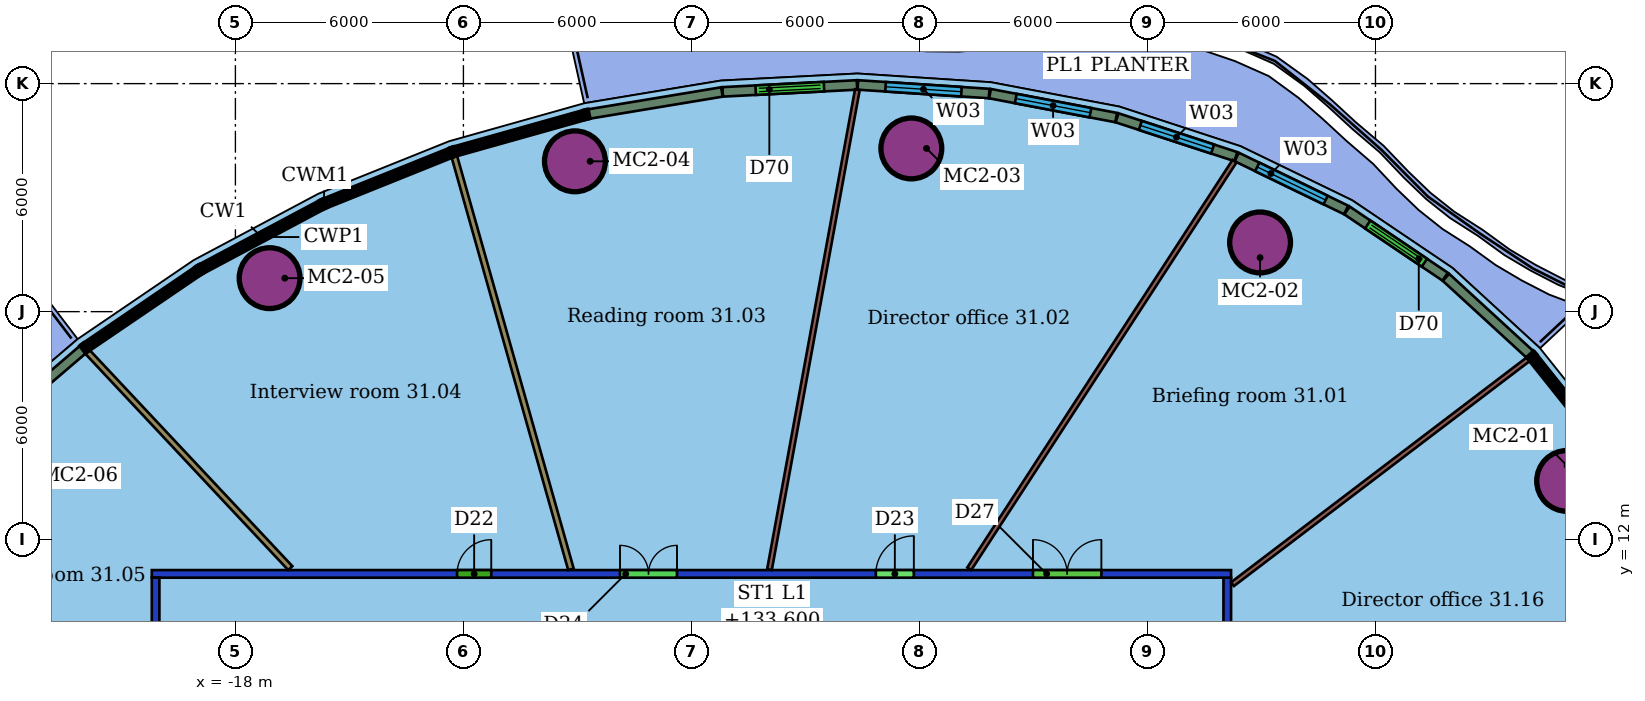
"""IFC4 building model, lengths in metres.
Left out: names, types, materials, properties, quantities, classifications, styles, units other than length and angle.
Written with IfcOpenShell. Run it as: python <this file> out.ifc"""

import sys

from ifc_helpers import new_model, si_unit, direction, frame, frame_2d, origin, origin_2d, place, context, subcontext, project, spatial, rectangle, hollow_circle, extrude, element, fill, save


model = new_model("IFC4")
c1 = context("Model", 3, precision=1e-05, world=origin(), true_north=direction((0.0, 1.0)))
c2 = subcontext(c1, "Body", "Model", "MODEL_VIEW")
j1 = project(units=[si_unit("LENGTHUNIT", "METRE"), si_unit("PLANEANGLEUNIT", "RADIAN")], contexts=[c1])
p1 = place(None, origin())
s1 = spatial("IfcSite", under=j1, at=p1, CompositionType="ELEMENT")
p2 = place(p1, origin())
s2 = spatial("IfcBuilding", under=s1, at=p2, CompositionType="ELEMENT")
p3 = place(p2, frame((0.0, 0.0, 131.8)))
s3 = spatial("IfcBuildingStorey", under=s2, at=p3, CompositionType="ELEMENT", Elevation=131.8)
for number, where, z_axis, x_axis in (
    (1, (17.043, 13.547, 0.0), (0.0, 0.0, 1.0), (1.0, 0.0, 0.0)),
    (2, (8.963, 19.821, 0.0), (0.0, 0.0, 1.0), (1.0, 0.0, 0.0)),
    (3, (-0.213, 22.294, 0.0), (0.0, 0.0, 1.0), (1.0, 0.0, 0.0)),
    (4, (-9.066, 21.956, 0.0), (0.0, 0.0, 1.0), (1.0, 0.0, 0.0)),
    (5, (-17.1, 18.881, 0.0), (0.0, 0.0, 1.0), (1.0, 0.0, 0.0)),
):
    element("IfcColumn", number, at=place(p3, frame(where, z_axis=z_axis, x_axis=x_axis)), inside=s3, PredefinedType="COLUMN", context=c2, shape_type="SweptSolid", body=[
        extrude(hollow_circle(Radius=0.8, WallThickness=0.055, at=origin_2d()), origin(), (0.0, 0.0, 1.0), 3.4),
    ])
p4 = place(p3, frame((-20.1, -11.0, 0.0), z_axis=(0.0, 0.0, 1.0), x_axis=(0.0, 1.0, 0.0)))
e6 = element("IfcWall", 6, at=p4, inside=s3, PredefinedType="PARTITIONING", context=c2, shape_type="SweptSolid", body=[
    extrude(rectangle(XDim=22.0, YDim=0.2, at=frame_2d((11.0, 0.0))), origin(), (0.0, 0.0, 1.0), 2.95),
])
p5 = place(p4, frame((18.223, 0.0, 0.0)))
e7 = element("IfcOpeningElement", 7, at=p5, cuts=e6, PredefinedType="OPENING", context=c2, shape_type="SweptSolid", body=[
    extrude(rectangle(XDim=0.9, YDim=2.1, at=frame_2d((0.45, 1.05))), frame((0.0, 0.11, 0.0), z_axis=(0.0, -1.0, 0.0), x_axis=(1.0, 0.0, 0.0)), (0.0, 0.0, 1.0), 0.22),
])
p6 = place(p4, frame((13.758, 0.0, 0.0)))
e8 = element("IfcOpeningElement", 8, at=p6, cuts=e6, PredefinedType="OPENING", context=c2, shape_type="SweptSolid", body=[
    extrude(rectangle(XDim=1.5, YDim=2.1, at=frame_2d((0.75, 1.05))), frame((0.0, 0.11, 0.0), z_axis=(0.0, -1.0, 0.0), x_axis=(1.0, 0.0, 0.0)), (0.0, 0.0, 1.0), 0.22),
])
p7 = place(p4, frame((7.252, 0.0, 0.0)))
e9 = element("IfcOpeningElement", 9, at=p7, cuts=e6, PredefinedType="OPENING", context=c2, shape_type="SweptSolid", body=[
    extrude(rectangle(XDim=1.8, YDim=2.4, at=frame_2d((0.9, 1.2))), frame((0.0, 0.11, 0.0), z_axis=(0.0, -1.0, 0.0), x_axis=(1.0, 0.0, 0.0)), (0.0, 0.0, 1.0), 0.22),
])
p8 = place(p4, frame((3.502, 0.0, 0.0)))
e10 = element("IfcOpeningElement", 10, at=p8, cuts=e6, PredefinedType="OPENING", context=c2, shape_type="SweptSolid", body=[
    extrude(rectangle(XDim=1.0, YDim=2.4, at=frame_2d((0.5, 1.2))), frame((0.0, 0.11, 0.0), z_axis=(0.0, -1.0, 0.0), x_axis=(1.0, 0.0, 0.0)), (0.0, 0.0, 1.0), 0.22),
])
p9 = place(p3, frame((-20.2, 11.1, 0.0), z_axis=(0.0, 0.0, 1.0), x_axis=(1.0, 0.0, 0.0)))
e11 = element("IfcWall", 11, at=p9, inside=s3, PredefinedType="PARTITIONING", context=c2, shape_type="SweptSolid", body=[
    extrude(rectangle(XDim=28.4, YDim=0.2, at=frame_2d((14.2, 0.0))), origin(), (0.0, 0.0, 1.0), 2.95),
])
p10 = place(p9, frame((23.187, 0.0, 0.0)))
e12 = element("IfcOpeningElement", 12, at=p10, cuts=e11, PredefinedType="OPENING", context=c2, shape_type="SweptSolid", body=[
    extrude(rectangle(XDim=1.8, YDim=2.4, at=frame_2d((0.9, 1.2))), frame((0.0, 0.11, 0.0), z_axis=(0.0, -1.0, 0.0), x_axis=(1.0, 0.0, 0.0)), (0.0, 0.0, 1.0), 0.22),
])
p11 = place(p9, frame((19.052, 0.0, 0.0)))
e13 = element("IfcOpeningElement", 13, at=p11, cuts=e11, PredefinedType="OPENING", context=c2, shape_type="SweptSolid", body=[
    extrude(rectangle(XDim=1.0, YDim=2.4, at=frame_2d((0.5, 1.2))), frame((0.0, 0.11, 0.0), z_axis=(0.0, -1.0, 0.0), x_axis=(1.0, 0.0, 0.0)), (0.0, 0.0, 1.0), 0.22),
])
p12 = place(p9, frame((12.32, 0.0, 0.0)))
e14 = element("IfcOpeningElement", 14, at=p12, cuts=e11, PredefinedType="OPENING", context=c2, shape_type="SweptSolid", body=[
    extrude(rectangle(XDim=1.5, YDim=2.1, at=frame_2d((0.75, 1.05))), frame((0.0, 0.11, 0.0), z_axis=(0.0, -1.0, 0.0), x_axis=(1.0, 0.0, 0.0)), (0.0, 0.0, 1.0), 0.22),
])
p13 = place(p9, frame((8.033, 0.0, 0.0)))
e15 = element("IfcOpeningElement", 15, at=p13, cuts=e11, PredefinedType="OPENING", context=c2, shape_type="SweptSolid", body=[
    extrude(rectangle(XDim=0.9, YDim=2.1, at=frame_2d((0.45, 1.05))), frame((0.0, 0.11, 0.0), z_axis=(0.0, -1.0, 0.0), x_axis=(1.0, 0.0, 0.0)), (0.0, 0.0, 1.0), 0.22),
])
p14 = place(p3, frame((8.1, 11.0, 0.0), z_axis=(0.0, 0.0, 1.0), x_axis=(0.0, -1.0, 0.0)))
e16 = element("IfcWall", 16, at=p14, inside=s3, PredefinedType="PARTITIONING", context=c2, shape_type="SweptSolid", body=[
    extrude(rectangle(XDim=22.0, YDim=0.2, at=frame_2d((11.0, 0.0))), origin(), (0.0, 0.0, 1.0), 2.95),
])
p15 = place(p14, frame((18.043, 0.0, 0.0)))
e17 = element("IfcOpeningElement", 17, at=p15, cuts=e16, PredefinedType="OPENING", context=c2, shape_type="SweptSolid", body=[
    extrude(rectangle(XDim=1.5, YDim=2.1, at=frame_2d((0.75, 1.05))), frame((0.0, 0.11, 0.0), z_axis=(0.0, -1.0, 0.0), x_axis=(1.0, 0.0, 0.0)), (0.0, 0.0, 1.0), 0.22),
])
p16 = place(p14, frame((14.113, 0.0, 0.0)))
e18 = element("IfcOpeningElement", 18, at=p16, cuts=e16, PredefinedType="OPENING", context=c2, shape_type="SweptSolid", body=[
    extrude(rectangle(XDim=1.0, YDim=2.4, at=frame_2d((0.5, 1.2))), frame((0.0, 0.11, 0.0), z_axis=(0.0, -1.0, 0.0), x_axis=(1.0, 0.0, 0.0)), (0.0, 0.0, 1.0), 0.22),
])
p17 = place(p14, frame((7.247, 0.0, 0.0)))
e19 = element("IfcOpeningElement", 19, at=p17, cuts=e16, PredefinedType="OPENING", context=c2, shape_type="SweptSolid", body=[
    extrude(rectangle(XDim=1.8, YDim=2.4, at=frame_2d((0.9, 1.2))), frame((0.0, 0.11, 0.0), z_axis=(0.0, -1.0, 0.0), x_axis=(1.0, 0.0, 0.0)), (0.0, 0.0, 1.0), 0.22),
])
p18 = place(p14, frame((3.502, 0.0, 0.0)))
e20 = element("IfcOpeningElement", 20, at=p18, cuts=e16, PredefinedType="OPENING", context=c2, shape_type="SweptSolid", body=[
    extrude(rectangle(XDim=1.0, YDim=2.4, at=frame_2d((0.5, 1.2))), frame((0.0, 0.11, 0.0), z_axis=(0.0, -1.0, 0.0), x_axis=(1.0, 0.0, 0.0)), (0.0, 0.0, 1.0), 0.22),
])
p19 = place(p3, frame((16.02, 16.748, 0.0), z_axis=(0.0, 0.0, 1.0), x_axis=(-0.795936459637, -0.605380171644, 0.0)))
e21 = element("IfcWall", 21, at=p19, inside=s3, PredefinedType="PARTITIONING", context=c2, shape_type="SweptSolid", body=[
    extrude(rectangle(XDim=9.777, YDim=0.125, at=frame_2d((4.888, 0.0))), origin(), (0.0, 0.0, 1.0), 3.4),
])
p20 = place(p3, frame((8.291, 21.959, 0.0), z_axis=(0.0, 0.0, 1.0), x_axis=(-0.545464395773, -0.838133994624, 0.0)))
e22 = element("IfcWall", 22, at=p20, inside=s3, PredefinedType="PARTITIONING", context=c2, shape_type="SweptSolid", body=[
    extrude(rectangle(XDim=12.796, YDim=0.125, at=frame_2d((6.398, 0.0))), origin(), (0.0, 0.0, 1.0), 3.4),
])
p21 = place(p3, frame((-1.634, 23.841, 0.0), z_axis=(0.0, 0.0, 1.0), x_axis=(-0.180140227772, -0.983640939743, 0.0)))
e23 = element("IfcWall", 23, at=p21, inside=s3, PredefinedType="PARTITIONING", context=c2, shape_type="SweptSolid", body=[
    extrude(rectangle(XDim=12.84, YDim=0.125, at=frame_2d((6.42, 0.0))), origin(), (0.0, 0.0, 1.0), 3.4),
])
p22 = place(p3, frame((-12.239, 22.082, 0.0), z_axis=(0.0, 0.0, 1.0), x_axis=(0.271903007498, -0.962324661699, 0.0)))
e24 = element("IfcWall", 24, at=p22, inside=s3, PredefinedType="PARTITIONING", context=c2, shape_type="SweptSolid", body=[
    extrude(rectangle(XDim=11.287, YDim=0.15, at=frame_2d((5.643, 0.0))), origin(), (0.0, 0.0, 1.0), 3.4),
])
p23 = place(p3, frame((-21.893, 16.941, 0.0), z_axis=(0.0, 0.0, 1.0), x_axis=(0.684185696534, -0.729307844917, 0.0)))
e25 = element("IfcWall", 25, at=p23, inside=s3, PredefinedType="PARTITIONING", context=c2, shape_type="SweptSolid", body=[
    extrude(rectangle(XDim=7.802, YDim=0.15, at=frame_2d((3.901, 0.0))), origin(), (0.0, 0.0, 1.0), 3.4),
])
p24 = place(p3, frame((16.07, 16.87, 0.0), z_axis=(0.0, 0.0, 1.0), x_axis=(-0.736827064846, 0.676081264724, 0.0)))
e26 = element("IfcWall", 26, at=p24, inside=s3, PredefinedType="SOLIDWALL", context=c2, shape_type="SweptSolid", body=[
    extrude(rectangle(XDim=3.006, YDim=0.25, at=frame_2d((1.503, 0.0))), origin(), (0.0, 0.0, 1.0), 3.0),
])
p25 = place(p3, frame((13.834, 18.919, 0.0), z_axis=(0.0, 0.0, 1.0), x_axis=(-0.829037505095, 0.559193003484, 0.0)))
e27 = element("IfcWall", 27, at=p25, inside=s3, PredefinedType="SOLIDWALL", context=c2, shape_type="SweptSolid", body=[
    extrude(rectangle(XDim=3.117, YDim=0.25, at=frame_2d((1.559, 0.0))), origin(), (0.0, 0.0, 1.0), 3.0),
])
p26 = place(p25, frame((0.658, 0.0, 0.0)))
e28 = element("IfcOpeningElement", 28, at=p26, cuts=e27, PredefinedType="OPENING", context=c2, shape_type="SweptSolid", body=[
    extrude(rectangle(XDim=1.8, YDim=2.4, at=frame_2d((0.9, 1.2))), frame((0.0, 0.135, 0.0), z_axis=(0.0, -1.0, 0.0), x_axis=(1.0, 0.0, 0.0)), (0.0, 0.0, 1.0), 0.27),
])
p27 = place(p3, frame((11.228, 20.675, 0.0), z_axis=(0.0, 0.0, 1.0), x_axis=(-0.899958400028, 0.435975777102, 0.0)))
e29 = element("IfcWall", 29, at=p27, inside=s3, PredefinedType="SOLIDWALL", context=c2, shape_type="SweptSolid", body=[
    extrude(rectangle(XDim=3.199, YDim=0.25, at=frame_2d((1.6, 0.0))), origin(), (0.0, 0.0, 1.0), 3.0),
])
p28 = place(p27, frame((0.6, 0.0, 0.9)))
e30 = element("IfcOpeningElement", 30, at=p28, cuts=e29, PredefinedType="OPENING", context=c2, shape_type="SweptSolid", body=[
    extrude(rectangle(XDim=2.0, YDim=2.1, at=frame_2d((1.0, 1.05))), frame((0.0, 0.135, 0.0), z_axis=(0.0, -1.0, 0.0), x_axis=(1.0, 0.0, 0.0)), (0.0, 0.0, 1.0), 0.27),
])
p29 = place(p3, frame((8.326, 22.079, 0.0), z_axis=(0.0, 0.0, 1.0), x_axis=(-0.950530319669, 0.310631793915, 0.0)))
e31 = element("IfcWall", 31, at=p29, inside=s3, PredefinedType="SOLIDWALL", context=c2, shape_type="SweptSolid", body=[
    extrude(rectangle(XDim=3.288, YDim=0.25, at=frame_2d((1.644, 0.0))), origin(), (0.0, 0.0, 1.0), 3.0),
])
p30 = place(p29, frame((0.644, 0.0, 0.9)))
e32 = element("IfcOpeningElement", 32, at=p30, cuts=e31, PredefinedType="OPENING", context=c2, shape_type="SweptSolid", body=[
    extrude(rectangle(XDim=2.0, YDim=2.1, at=frame_2d((1.0, 1.05))), frame((0.0, 0.135, 0.0), z_axis=(0.0, -1.0, 0.0), x_axis=(1.0, 0.0, 0.0)), (0.0, 0.0, 1.0), 0.27),
])
p31 = place(p3, frame((5.177, 23.107, 0.0), z_axis=(0.0, 0.0, 1.0), x_axis=(-0.982478083438, 0.186378152055, 0.0)))
e33 = element("IfcWall", 33, at=p31, inside=s3, PredefinedType="SOLIDWALL", context=c2, shape_type="SweptSolid", body=[
    extrude(rectangle(XDim=3.378, YDim=0.25, at=frame_2d((1.689, 0.0))), origin(), (0.0, 0.0, 1.0), 3.0),
])
p32 = place(p31, frame((0.689, 0.0, 0.9)))
e34 = element("IfcOpeningElement", 34, at=p32, cuts=e33, PredefinedType="OPENING", context=c2, shape_type="SweptSolid", body=[
    extrude(rectangle(XDim=2.0, YDim=2.1, at=frame_2d((1.0, 1.05))), frame((0.0, 0.135, 0.0), z_axis=(0.0, -1.0, 0.0), x_axis=(1.0, 0.0, 0.0)), (0.0, 0.0, 1.0), 0.27),
])
p33 = place(p3, frame((1.834, 23.739, 0.0), z_axis=(0.0, 0.0, 1.0), x_axis=(-0.997871338214, 0.065213437039, 0.0)))
e35 = element("IfcWall", 35, at=p33, inside=s3, PredefinedType="SOLIDWALL", context=c2, shape_type="SweptSolid", body=[
    extrude(rectangle(XDim=3.463, YDim=0.25, at=frame_2d((1.731, 0.0))), origin(), (0.0, 0.0, 1.0), 3.0),
])
p34 = place(p33, frame((0.731, 0.0, 0.9)))
e36 = element("IfcOpeningElement", 36, at=p34, cuts=e35, PredefinedType="OPENING", context=c2, shape_type="SweptSolid", body=[
    extrude(rectangle(XDim=2.0, YDim=2.1, at=frame_2d((1.0, 1.05))), frame((0.0, 0.135, 0.0), z_axis=(0.0, -1.0, 0.0), x_axis=(1.0, 0.0, 0.0)), (0.0, 0.0, 1.0), 0.27),
])
p35 = place(p3, frame((-1.644, 23.965, 0.0), z_axis=(0.0, 0.0, 1.0), x_axis=(-0.998669769299, -0.051562504677, 0.0)))
e37 = element("IfcWall", 37, at=p35, inside=s3, PredefinedType="SOLIDWALL", context=c2, shape_type="SweptSolid", body=[
    extrude(rectangle(XDim=3.537, YDim=0.25, at=frame_2d((1.769, 0.0))), origin(), (0.0, 0.0, 1.0), 3.0),
])
p36 = place(p35, frame((0.869, 0.0, 0.0)))
e38 = element("IfcOpeningElement", 38, at=p36, cuts=e37, PredefinedType="OPENING", context=c2, shape_type="SweptSolid", body=[
    extrude(rectangle(XDim=1.8, YDim=2.4, at=frame_2d((0.9, 1.2))), frame((0.0, 0.135, 0.0), z_axis=(0.0, -1.0, 0.0), x_axis=(1.0, 0.0, 0.0)), (0.0, 0.0, 1.0), 0.27),
])
for number, where, z_axis, x_axis in (
    (39, (-5.198, 23.781, 0.0), (0.0, 0.0, 1.0), (-0.987, -0.164, 0.0)),
    (40, (-22.011, 17.005, 0.0), (0.0, 0.0, 1.0), (-0.76, -0.649, 0.0)),
):
    element("IfcWall", number, at=place(p3, frame(where, z_axis=z_axis, x_axis=x_axis)), inside=s3, PredefinedType="SOLIDWALL", context=c2, shape_type="SweptSolid", body=[
        extrude(rectangle(XDim=3.552, YDim=0.25, at=frame_2d((1.776, 0.0))), origin(), (0.0, 0.0, 1.0), 3.0),
    ])
p37 = place(p10, origin())
e41 = element("IfcDoor", 41, at=p37, inside=s3, OperationType="DOUBLE_DOOR_SINGLE_SWING", PredefinedType="DOOR", context=c2, shape_type="SweptSolid", body=[
    extrude(rectangle(XDim=1.8, YDim=2.4, at=frame_2d((0.9, 1.2))), frame((0.0, 0.025, 0.0), z_axis=(0.0, -1.0, 0.0), x_axis=(1.0, 0.0, 0.0)), (0.0, 0.0, 1.0), 0.05),
])
fill(e12, e41)
p38 = place(p11, origin())
e42 = element("IfcDoor", 42, at=p38, inside=s3, OperationType="SINGLE_SWING_RIGHT", PredefinedType="DOOR", context=c2, shape_type="SweptSolid", body=[
    extrude(rectangle(XDim=1.0, YDim=2.4, at=frame_2d((0.5, 1.2))), frame((0.0, 0.025, 0.0), z_axis=(0.0, -1.0, 0.0), x_axis=(1.0, 0.0, 0.0)), (0.0, 0.0, 1.0), 0.05),
])
fill(e13, e42)
p39 = place(p12, origin())
e43 = element("IfcDoor", 43, at=p39, inside=s3, OperationType="DOUBLE_DOOR_SINGLE_SWING", PredefinedType="DOOR", context=c2, shape_type="SweptSolid", body=[
    extrude(rectangle(XDim=1.5, YDim=2.1, at=frame_2d((0.75, 1.05))), frame((0.0, 0.025, 0.0), z_axis=(0.0, -1.0, 0.0), x_axis=(1.0, 0.0, 0.0)), (0.0, 0.0, 1.0), 0.05),
])
fill(e14, e43)
p40 = place(p13, origin())
e44 = element("IfcDoor", 44, at=p40, inside=s3, OperationType="SINGLE_SWING_RIGHT", PredefinedType="DOOR", context=c2, shape_type="SweptSolid", body=[
    extrude(rectangle(XDim=0.9, YDim=2.1, at=frame_2d((0.45, 1.05))), frame((0.0, 0.025, 0.0), z_axis=(0.0, -1.0, 0.0), x_axis=(1.0, 0.0, 0.0)), (0.0, 0.0, 1.0), 0.05),
])
fill(e15, e44)
p41 = place(p26, origin())
e45 = element("IfcDoor", 45, at=p41, inside=s3, OperationType="DOUBLE_DOOR_SLIDING", PredefinedType="DOOR", context=c2, shape_type="SweptSolid", body=[
    extrude(rectangle(XDim=1.8, YDim=2.4, at=frame_2d((0.9, 1.2))), frame((0.0, 0.025, 0.0), z_axis=(0.0, -1.0, 0.0), x_axis=(1.0, 0.0, 0.0)), (0.0, 0.0, 1.0), 0.05),
])
fill(e28, e45)
p42 = place(p28, origin())
e46 = element("IfcWindow", 46, at=p42, inside=s3, PartitioningType="SINGLE_PANEL", PredefinedType="WINDOW", context=c2, shape_type="SweptSolid", body=[
    extrude(rectangle(XDim=2.0, YDim=2.1, at=frame_2d((1.0, 1.05))), frame((0.0, 0.03, 0.0), z_axis=(0.0, -1.0, 0.0), x_axis=(1.0, 0.0, 0.0)), (0.0, 0.0, 1.0), 0.06),
])
fill(e30, e46)
p43 = place(p30, origin())
e47 = element("IfcWindow", 47, at=p43, inside=s3, PartitioningType="SINGLE_PANEL", PredefinedType="WINDOW", context=c2, shape_type="SweptSolid", body=[
    extrude(rectangle(XDim=2.0, YDim=2.1, at=frame_2d((1.0, 1.05))), frame((0.0, 0.03, 0.0), z_axis=(0.0, -1.0, 0.0), x_axis=(1.0, 0.0, 0.0)), (0.0, 0.0, 1.0), 0.06),
])
fill(e32, e47)
p44 = place(p32, origin())
e48 = element("IfcWindow", 48, at=p44, inside=s3, PartitioningType="SINGLE_PANEL", PredefinedType="WINDOW", context=c2, shape_type="SweptSolid", body=[
    extrude(rectangle(XDim=2.0, YDim=2.1, at=frame_2d((1.0, 1.05))), frame((0.0, 0.03, 0.0), z_axis=(0.0, -1.0, 0.0), x_axis=(1.0, 0.0, 0.0)), (0.0, 0.0, 1.0), 0.06),
])
fill(e34, e48)
p45 = place(p34, origin())
e49 = element("IfcWindow", 49, at=p45, inside=s3, PartitioningType="SINGLE_PANEL", PredefinedType="WINDOW", context=c2, shape_type="SweptSolid", body=[
    extrude(rectangle(XDim=2.0, YDim=2.1, at=frame_2d((1.0, 1.05))), frame((0.0, 0.03, 0.0), z_axis=(0.0, -1.0, 0.0), x_axis=(1.0, 0.0, 0.0)), (0.0, 0.0, 1.0), 0.06),
])
fill(e36, e49)
p46 = place(p36, origin())
e50 = element("IfcDoor", 50, at=p46, inside=s3, OperationType="DOUBLE_DOOR_SLIDING", PredefinedType="DOOR", context=c2, shape_type="SweptSolid", body=[
    extrude(rectangle(XDim=1.8, YDim=2.4, at=frame_2d((0.9, 1.2))), frame((0.0, 0.025, 0.0), z_axis=(0.0, -1.0, 0.0), x_axis=(1.0, 0.0, 0.0)), (0.0, 0.0, 1.0), 0.05),
])
fill(e38, e50)
save(model, sys.argv[1])
